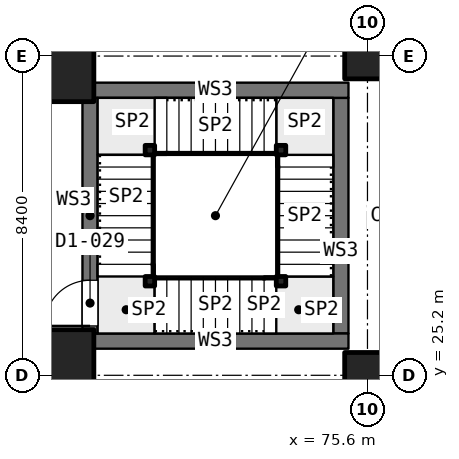
"""IFC4 building model, lengths in metres.
Left out: names, types, materials, properties, quantities, classifications, styles, units other than length and angle.
Written with IfcOpenShell. Run it as: python <this file> out.ifc"""

import sys

from ifc_helpers import new_model, si_unit, direction, frame, frame_2d, origin, origin_2d, place, context, subcontext, project, spatial, rectangle, extrude, element, fill, save


model = new_model("IFC4")
c1 = context("Model", 3, precision=1e-05, world=origin(), true_north=direction((0.0, 1.0)))
c2 = subcontext(c1, "Body", "Model", "MODEL_VIEW")
j1 = project(units=[si_unit("LENGTHUNIT", "METRE"), si_unit("PLANEANGLEUNIT", "RADIAN")], contexts=[c1])
p1 = place(None, origin())
s1 = spatial("IfcSite", under=j1, at=p1, CompositionType="ELEMENT")
p2 = place(p1, origin())
s2 = spatial("IfcBuilding", under=s1, at=p2, CompositionType="ELEMENT")
p3 = place(p2, frame((0.0, 0.0, 5.4)))
s3 = spatial("IfcBuildingStorey", under=s2, at=p3, CompositionType="ELEMENT", Elevation=5.4)
for number, where, z_axis, x_axis in (
    (1, (67.2, 25.2, 0.0), (0.0, 0.0, 1.0), (1.0, 0.0, 0.0)),
    (2, (67.2, 33.6, 0.0), (0.0, 0.0, 1.0), (1.0, 0.0, 0.0)),
):
    element("IfcColumn", number, at=place(p3, frame(where, z_axis=z_axis, x_axis=x_axis)), inside=s3, PredefinedType="COLUMN", context=c2, shape_type="SweptSolid", body=[
        extrude(rectangle(XDim=2.4, YDim=2.4, at=origin_2d()), origin(), (0.0, 0.0, 1.0), 5.0),
    ])
for number, where, z_axis, x_axis in (
    (3, (75.6, 25.2, 0.0), (0.0, 0.0, 1.0), (1.0, 0.0, 0.0)),
    (4, (75.6, 33.6, 0.0), (0.0, 0.0, 1.0), (1.0, 0.0, 0.0)),
):
    element("IfcColumn", number, at=place(p3, frame(where, z_axis=z_axis, x_axis=x_axis)), inside=s3, PredefinedType="COLUMN", context=c2, shape_type="SweptSolid", body=[
        extrude(rectangle(XDim=1.2, YDim=1.2, at=origin_2d()), origin(), (0.0, 0.0, 1.0), 5.0),
    ])
for number, where, z_axis, x_axis in (
    (5, (68.1, 26.1, 0.0), (0.0, 0.0, 1.0), (1.0, 0.0, 0.0)),
    (6, (68.1, 32.7, 0.0), (0.0, 0.0, 1.0), (1.0, 0.0, 0.0)),
):
    element("IfcWall", number, at=place(p3, frame(where, z_axis=z_axis, x_axis=x_axis)), inside=s3, PredefinedType="SOLIDWALL", context=c2, shape_type="SweptSolid", body=[
        extrude(rectangle(XDim=7.0, YDim=0.4, at=frame_2d((3.5, 0.0))), origin(), (0.0, 0.0, 1.0), 4.7),
    ])
p4 = place(p3, frame((68.3, 26.3, 0.0), z_axis=(0.0, 0.0, 1.0), x_axis=(0.0, 1.0, 0.0)))
e7 = element("IfcWall", 7, at=p4, inside=s3, PredefinedType="SOLIDWALL", context=c2, shape_type="SweptSolid", body=[
    extrude(rectangle(XDim=6.2, YDim=0.4, at=frame_2d((3.1, 0.0))), origin(), (0.0, 0.0, 1.0), 4.7),
])
p5 = place(p4, frame((0.2, 0.0, 0.0)))
e8 = element("IfcOpeningElement", 8, at=p5, cuts=e7, PredefinedType="OPENING", context=c2, shape_type="SweptSolid", body=[
    extrude(rectangle(XDim=1.2, YDim=2.1, at=frame_2d((0.6, 1.05))), frame((0.0, 0.21, 0.0), z_axis=(0.0, -1.0, 0.0), x_axis=(1.0, 0.0, 0.0)), (0.0, 0.0, 1.0), 0.42),
])
p6 = place(p3, frame((74.9, 26.3, 0.0), z_axis=(0.0, 0.0, 1.0), x_axis=(0.0, 1.0, 0.0)))
e9 = element("IfcWall", 9, at=p6, inside=s3, PredefinedType="SOLIDWALL", context=c2, shape_type="SweptSolid", body=[
    extrude(rectangle(XDim=6.2, YDim=0.4, at=frame_2d((3.1, 0.0))), origin(), (0.0, 0.0, 1.0), 4.7),
])
for number, where, z_axis, x_axis in (
    (10, (69.875, 27.675, 0.0), (0.0, 0.0, 1.0), (1.0, 0.0, 0.0)),
    (11, (73.325, 27.675, 0.0), (0.0, 0.0, 1.0), (1.0, 0.0, 0.0)),
    (12, (73.325, 31.125, 0.0), (0.0, 0.0, 1.0), (1.0, 0.0, 0.0)),
    (13, (69.875, 31.125, 0.0), (0.0, 0.0, 1.0), (1.0, 0.0, 0.0)),
):
    element("IfcColumn", number, at=place(p3, frame(where, z_axis=z_axis, x_axis=x_axis)), inside=s3, PredefinedType="COLUMN", context=c2, shape_type="SweptSolid", body=[
        extrude(rectangle(XDim=0.25, YDim=0.25, at=origin_2d()), origin(), (0.0, 0.0, 1.0), 5.0),
    ])
p7 = place(p5, origin())
e14 = element("IfcDoor", 14, at=p7, inside=s3, OperationType="SINGLE_SWING_RIGHT", PredefinedType="DOOR", context=c2, shape_type="SweptSolid", body=[
    extrude(rectangle(XDim=1.2, YDim=2.1, at=frame_2d((0.6, 1.05))), frame((0.0, 0.025, 0.0), z_axis=(0.0, -1.0, 0.0), x_axis=(1.0, 0.0, 0.0)), (0.0, 0.0, 1.0), 0.05),
])
fill(e8, e14)
save(model, sys.argv[1])
